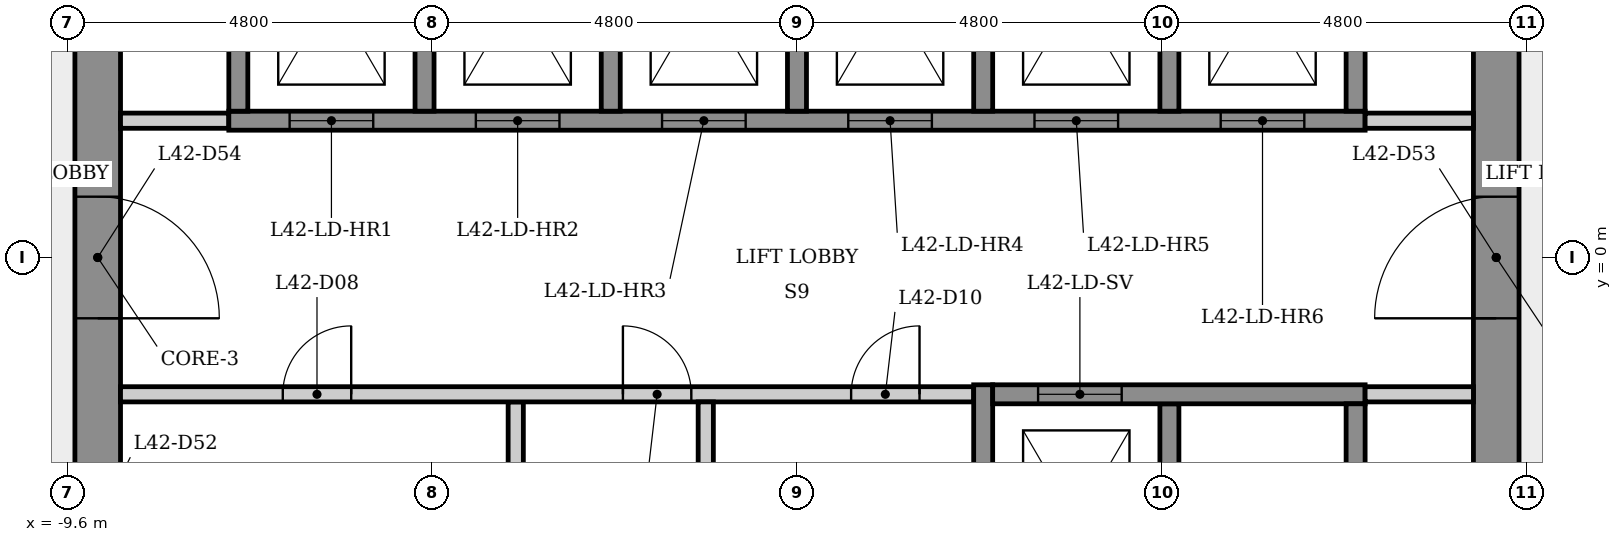
"""IFC4 building model, lengths in metres.
Left out: names, types, materials, properties, quantities, classifications, styles, units other than length and angle.
Written with IfcOpenShell. Run it as: python <this file> out.ifc"""

import sys

from ifc_helpers import new_model, si_unit, direction, frame, frame_2d, origin, place, context, subcontext, project, spatial, rectangle, extrude, element, fill, save


model = new_model("IFC4")
c1 = context("Model", 3, precision=1e-05, world=origin(), true_north=direction((0.0, 1.0)))
c2 = subcontext(c1, "Body", "Model", "MODEL_VIEW")
j1 = project(units=[si_unit("LENGTHUNIT", "METRE"), si_unit("PLANEANGLEUNIT", "RADIAN")], contexts=[c1])
p1 = place(None, origin())
s1 = spatial("IfcSite", under=j1, at=p1, CompositionType="ELEMENT")
p2 = place(p1, origin())
s2 = spatial("IfcBuilding", under=s1, at=p2, CompositionType="ELEMENT")
p3 = place(p2, frame((0.0, 0.0, 159.5)))
s3 = spatial("IfcBuildingStorey", under=s2, at=p3, CompositionType="ELEMENT", Elevation=159.5)
p4 = place(p3, frame((9.2, -5.485, 0.0), z_axis=(0.0, 0.0, 1.0), x_axis=(0.0, 1.0, 0.0)))
e1 = element("IfcWall", 1, at=p4, inside=s3, PredefinedType="SHEAR", context=c2, shape_type="SweptSolid", body=[
    extrude(rectangle(XDim=10.97, YDim=0.6, at=frame_2d((5.485, 0.0))), origin(), (0.0, 0.0, 1.0), 3.4),
])
p5 = place(p4, frame((4.685, 0.0, 0.0)))
e2 = element("IfcOpeningElement", 2, at=p5, cuts=e1, PredefinedType="OPENING", context=c2, shape_type="SweptSolid", body=[
    extrude(rectangle(XDim=1.6, YDim=2.1, at=frame_2d((0.8, 1.05))), frame((0.0, 0.31, 0.0), z_axis=(0.0, -1.0, 0.0), x_axis=(1.0, 0.0, 0.0)), (0.0, 0.0, 1.0), 0.62),
])
p6 = place(p3, frame((-9.2, 5.485, 0.0), z_axis=(0.0, 0.0, 1.0), x_axis=(0.0, -1.0, 0.0)))
e3 = element("IfcWall", 3, at=p6, inside=s3, PredefinedType="SHEAR", context=c2, shape_type="SweptSolid", body=[
    extrude(rectangle(XDim=10.97, YDim=0.6, at=frame_2d((5.485, 0.0))), origin(), (0.0, 0.0, 1.0), 3.4),
])
p7 = place(p6, frame((8.516, 0.0, 0.0)))
e4 = element("IfcOpeningElement", 4, at=p7, cuts=e3, PredefinedType="OPENING", context=c2, shape_type="SweptSolid", body=[
    extrude(rectangle(XDim=0.9, YDim=2.1, at=frame_2d((0.45, 1.05))), frame((0.0, 0.31, 0.0), z_axis=(0.0, -1.0, 0.0), x_axis=(1.0, 0.0, 0.0)), (0.0, 0.0, 1.0), 0.62),
])
p8 = place(p6, frame((4.685, 0.0, 0.0)))
e5 = element("IfcOpeningElement", 5, at=p8, cuts=e3, PredefinedType="OPENING", context=c2, shape_type="SweptSolid", body=[
    extrude(rectangle(XDim=1.6, YDim=2.1, at=frame_2d((0.8, 1.05))), frame((0.0, 0.31, 0.0), z_axis=(0.0, -1.0, 0.0), x_axis=(1.0, 0.0, 0.0)), (0.0, 0.0, 1.0), 0.62),
])
p9 = place(p3, frame((-8.9, 1.8, 0.0), z_axis=(0.0, 0.0, 1.0), x_axis=(1.0, 0.0, 0.0)))
e6 = element("IfcWall", 6, at=p9, inside=s3, PredefinedType="PARTITIONING", context=c2, shape_type="SweptSolid", body=[
    extrude(rectangle(XDim=1.425, YDim=0.2, at=frame_2d((0.712, 0.0))), origin(), (0.0, 0.0, 1.0), 3.05),
])
p10 = place(p3, frame((-7.475, 1.8, 0.0), z_axis=(0.0, 0.0, 1.0), x_axis=(1.0, 0.0, 0.0)))
e7 = element("IfcWall", 7, at=p10, inside=s3, PredefinedType="SHEAR", context=c2, shape_type="SweptSolid", body=[
    extrude(rectangle(XDim=14.95, YDim=0.25, at=frame_2d((7.475, 0.0))), origin(), (0.0, 0.0, 1.0), 3.05),
])
p11 = place(p10, frame((0.8, 0.0, 0.0)))
e8 = element("IfcOpeningElement", 8, at=p11, cuts=e7, PredefinedType="OPENING", context=c2, shape_type="SweptSolid", body=[
    extrude(rectangle(XDim=1.1, YDim=2.1, at=frame_2d((0.55, 1.05))), frame((0.0, 0.135, 0.0), z_axis=(0.0, -1.0, 0.0), x_axis=(1.0, 0.0, 0.0)), (0.0, 0.0, 1.0), 0.27),
])
p12 = place(p10, frame((3.25, 0.0, 0.0)))
e9 = element("IfcOpeningElement", 9, at=p12, cuts=e7, PredefinedType="OPENING", context=c2, shape_type="SweptSolid", body=[
    extrude(rectangle(XDim=1.1, YDim=2.1, at=frame_2d((0.55, 1.05))), frame((0.0, 0.135, 0.0), z_axis=(0.0, -1.0, 0.0), x_axis=(1.0, 0.0, 0.0)), (0.0, 0.0, 1.0), 0.27),
])
p13 = place(p10, frame((5.7, 0.0, 0.0)))
e10 = element("IfcOpeningElement", 10, at=p13, cuts=e7, PredefinedType="OPENING", context=c2, shape_type="SweptSolid", body=[
    extrude(rectangle(XDim=1.1, YDim=2.1, at=frame_2d((0.55, 1.05))), frame((0.0, 0.135, 0.0), z_axis=(0.0, -1.0, 0.0), x_axis=(1.0, 0.0, 0.0)), (0.0, 0.0, 1.0), 0.27),
])
p14 = place(p10, frame((8.15, 0.0, 0.0)))
e11 = element("IfcOpeningElement", 11, at=p14, cuts=e7, PredefinedType="OPENING", context=c2, shape_type="SweptSolid", body=[
    extrude(rectangle(XDim=1.1, YDim=2.1, at=frame_2d((0.55, 1.05))), frame((0.0, 0.135, 0.0), z_axis=(0.0, -1.0, 0.0), x_axis=(1.0, 0.0, 0.0)), (0.0, 0.0, 1.0), 0.27),
])
p15 = place(p10, frame((10.6, 0.0, 0.0)))
e12 = element("IfcOpeningElement", 12, at=p15, cuts=e7, PredefinedType="OPENING", context=c2, shape_type="SweptSolid", body=[
    extrude(rectangle(XDim=1.1, YDim=2.1, at=frame_2d((0.55, 1.05))), frame((0.0, 0.135, 0.0), z_axis=(0.0, -1.0, 0.0), x_axis=(1.0, 0.0, 0.0)), (0.0, 0.0, 1.0), 0.27),
])
p16 = place(p10, frame((13.05, 0.0, 0.0)))
e13 = element("IfcOpeningElement", 13, at=p16, cuts=e7, PredefinedType="OPENING", context=c2, shape_type="SweptSolid", body=[
    extrude(rectangle(XDim=1.1, YDim=2.1, at=frame_2d((0.55, 1.05))), frame((0.0, 0.135, 0.0), z_axis=(0.0, -1.0, 0.0), x_axis=(1.0, 0.0, 0.0)), (0.0, 0.0, 1.0), 0.27),
])
p17 = place(p3, frame((-7.35, 1.925, 0.0), z_axis=(0.0, 0.0, 1.0), x_axis=(0.0, 1.0, 0.0)))
e14 = element("IfcWall", 14, at=p17, inside=s3, PredefinedType="SHEAR", context=c2, shape_type="SweptSolid", body=[
    extrude(rectangle(XDim=4.036, YDim=0.25, at=frame_2d((2.018, 0.0))), origin(), (0.0, 0.0, 1.0), 3.05),
])
p18 = place(p3, frame((-4.9, 5.025, 0.0), z_axis=(0.0, 0.0, 1.0), x_axis=(0.0, -1.0, 0.0)))
e15 = element("IfcWall", 15, at=p18, inside=s3, PredefinedType="SHEAR", context=c2, shape_type="SweptSolid", body=[
    extrude(rectangle(XDim=3.1, YDim=0.25, at=frame_2d((1.55, 0.0))), origin(), (0.0, 0.0, 1.0), 3.4),
])
p19 = place(p3, frame((-3.7, -1.9, 0.0), z_axis=(0.0, 0.0, 1.0), x_axis=(0.0, -1.0, 0.0)))
e16 = element("IfcWall", 16, at=p19, inside=s3, PredefinedType="PARTITIONING", context=c2, shape_type="SweptSolid", body=[
    extrude(rectangle(XDim=3.15, YDim=0.2, at=frame_2d((1.575, 0.0))), origin(), (0.0, 0.0, 1.0), 3.05),
])
p20 = place(p3, frame((-8.9, -1.8, 0.0), z_axis=(0.0, 0.0, 1.0), x_axis=(1.0, 0.0, 0.0)))
e17 = element("IfcWall", 17, at=p20, inside=s3, PredefinedType="PARTITIONING", context=c2, shape_type="SweptSolid", body=[
    extrude(rectangle(XDim=11.225, YDim=0.2, at=frame_2d((5.613, 0.0))), origin(), (0.0, 0.0, 1.0), 3.05),
])
p21 = place(p20, frame((2.135, 0.0, 0.0)))
e18 = element("IfcOpeningElement", 18, at=p21, cuts=e17, PredefinedType="OPENING", context=c2, shape_type="SweptSolid", body=[
    extrude(rectangle(XDim=0.9, YDim=2.1, at=frame_2d((0.45, 1.05))), frame((0.0, 0.11, 0.0), z_axis=(0.0, -1.0, 0.0), x_axis=(1.0, 0.0, 0.0)), (0.0, 0.0, 1.0), 0.22),
])
p22 = place(p20, frame((6.61, 0.0, 0.0)))
e19 = element("IfcOpeningElement", 19, at=p22, cuts=e17, PredefinedType="OPENING", context=c2, shape_type="SweptSolid", body=[
    extrude(rectangle(XDim=0.9, YDim=2.1, at=frame_2d((0.45, 1.05))), frame((0.0, 0.11, 0.0), z_axis=(0.0, -1.0, 0.0), x_axis=(1.0, 0.0, 0.0)), (0.0, 0.0, 1.0), 0.22),
])
p23 = place(p20, frame((9.613, 0.0, 0.0)))
e20 = element("IfcOpeningElement", 20, at=p23, cuts=e17, PredefinedType="OPENING", context=c2, shape_type="SweptSolid", body=[
    extrude(rectangle(XDim=0.9, YDim=2.1, at=frame_2d((0.45, 1.05))), frame((0.0, 0.11, 0.0), z_axis=(0.0, -1.0, 0.0), x_axis=(1.0, 0.0, 0.0)), (0.0, 0.0, 1.0), 0.22),
])
p24 = place(p3, frame((-2.45, 5.025, 0.0), z_axis=(0.0, 0.0, 1.0), x_axis=(0.0, -1.0, 0.0)))
e21 = element("IfcWall", 21, at=p24, inside=s3, PredefinedType="SHEAR", context=c2, shape_type="SweptSolid", body=[
    extrude(rectangle(XDim=3.1, YDim=0.25, at=frame_2d((1.55, 0.0))), origin(), (0.0, 0.0, 1.0), 3.4),
])
p25 = place(p3, frame((-1.2, -1.9, 0.0), z_axis=(0.0, 0.0, 1.0), x_axis=(0.0, -1.0, 0.0)))
e22 = element("IfcWall", 22, at=p25, inside=s3, PredefinedType="PARTITIONING", context=c2, shape_type="SweptSolid", body=[
    extrude(rectangle(XDim=3.15, YDim=0.2, at=frame_2d((1.575, 0.0))), origin(), (0.0, 0.0, 1.0), 3.05),
])
p26 = place(p3, frame((0.0, 5.025, 0.0), z_axis=(0.0, 0.0, 1.0), x_axis=(0.0, -1.0, 0.0)))
e23 = element("IfcWall", 23, at=p26, inside=s3, PredefinedType="SHEAR", context=c2, shape_type="SweptSolid", body=[
    extrude(rectangle(XDim=3.1, YDim=0.25, at=frame_2d((1.55, 0.0))), origin(), (0.0, 0.0, 1.0), 3.4),
])
p27 = place(p3, frame((2.45, -5.275, 0.0), z_axis=(0.0, 0.0, 1.0), x_axis=(0.0, 1.0, 0.0)))
e24 = element("IfcWall", 24, at=p27, inside=s3, PredefinedType="SHEAR", context=c2, shape_type="SweptSolid", body=[
    extrude(rectangle(XDim=3.6, YDim=0.25, at=frame_2d((1.8, 0.0))), origin(), (0.0, 0.0, 1.0), 3.05),
])
for number, where, z_axis, x_axis in (
    (25, (2.45, 5.025, 0.0), (0.0, 0.0, 1.0), (0.0, -1.0, 0.0)),
    (26, (4.9, -1.925, 0.0), (0.0, 0.0, 1.0), (0.0, -1.0, 0.0)),
    (27, (4.9, 5.025, 0.0), (0.0, 0.0, 1.0), (0.0, -1.0, 0.0)),
):
    element("IfcWall", number, at=place(p3, frame(where, z_axis=z_axis, x_axis=x_axis)), inside=s3, PredefinedType="SHEAR", context=c2, shape_type="SweptSolid", body=[
        extrude(rectangle(XDim=3.1, YDim=0.25, at=frame_2d((1.55, 0.0))), origin(), (0.0, 0.0, 1.0), 3.4),
    ])
p28 = place(p3, frame((2.575, -1.8, 0.0), z_axis=(0.0, 0.0, 1.0), x_axis=(1.0, 0.0, 0.0)))
e28 = element("IfcWall", 28, at=p28, inside=s3, PredefinedType="SHEAR", context=c2, shape_type="SweptSolid", body=[
    extrude(rectangle(XDim=4.9, YDim=0.25, at=frame_2d((2.45, 0.0))), origin(), (0.0, 0.0, 1.0), 3.05),
])
p29 = place(p28, frame((0.597, 0.0, 0.0)))
e29 = element("IfcOpeningElement", 29, at=p29, cuts=e28, PredefinedType="OPENING", context=c2, shape_type="SweptSolid", body=[
    extrude(rectangle(XDim=1.1, YDim=2.1, at=frame_2d((0.55, 1.05))), frame((0.0, 0.135, 0.0), z_axis=(0.0, -1.0, 0.0), x_axis=(1.0, 0.0, 0.0)), (0.0, 0.0, 1.0), 0.27),
])
p30 = place(p3, frame((7.475, 1.8, 0.0), z_axis=(0.0, 0.0, 1.0), x_axis=(1.0, 0.0, 0.0)))
e30 = element("IfcWall", 30, at=p30, inside=s3, PredefinedType="PARTITIONING", context=c2, shape_type="SweptSolid", body=[
    extrude(rectangle(XDim=1.425, YDim=0.2, at=frame_2d((0.712, 0.0))), origin(), (0.0, 0.0, 1.0), 3.05),
])
for number, where, z_axis, x_axis in (
    (31, (7.35, -1.925, 0.0), (0.0, 0.0, 1.0), (0.0, -1.0, 0.0)),
    (32, (7.35, 5.025, 0.0), (0.0, 0.0, 1.0), (0.0, -1.0, 0.0)),
):
    element("IfcWall", number, at=place(p3, frame(where, z_axis=z_axis, x_axis=x_axis)), inside=s3, PredefinedType="SHEAR", context=c2, shape_type="SweptSolid", body=[
        extrude(rectangle(XDim=3.1, YDim=0.25, at=frame_2d((1.55, 0.0))), origin(), (0.0, 0.0, 1.0), 3.4),
    ])
p31 = place(p3, frame((8.9, -1.8, 0.0), z_axis=(0.0, 0.0, 1.0), x_axis=(-1.0, 0.0, 0.0)))
e33 = element("IfcWall", 33, at=p31, inside=s3, PredefinedType="PARTITIONING", context=c2, shape_type="SweptSolid", body=[
    extrude(rectangle(XDim=1.425, YDim=0.2, at=frame_2d((0.712, 0.0))), origin(), (0.0, 0.0, 1.0), 3.05),
])
p32 = place(p11, origin())
e34 = element("IfcDoor", 34, at=p32, inside=s3, OperationType="SLIDING_TO_LEFT", PredefinedType="DOOR", context=c2, shape_type="SweptSolid", body=[
    extrude(rectangle(XDim=1.1, YDim=2.1, at=frame_2d((0.55, 1.05))), frame((0.0, 0.025, 0.0), z_axis=(0.0, -1.0, 0.0), x_axis=(1.0, 0.0, 0.0)), (0.0, 0.0, 1.0), 0.05),
])
fill(e8, e34)
p33 = place(p12, origin())
e35 = element("IfcDoor", 35, at=p33, inside=s3, OperationType="SLIDING_TO_LEFT", PredefinedType="DOOR", context=c2, shape_type="SweptSolid", body=[
    extrude(rectangle(XDim=1.1, YDim=2.1, at=frame_2d((0.55, 1.05))), frame((0.0, 0.025, 0.0), z_axis=(0.0, -1.0, 0.0), x_axis=(1.0, 0.0, 0.0)), (0.0, 0.0, 1.0), 0.05),
])
fill(e9, e35)
p34 = place(p13, origin())
e36 = element("IfcDoor", 36, at=p34, inside=s3, OperationType="SLIDING_TO_LEFT", PredefinedType="DOOR", context=c2, shape_type="SweptSolid", body=[
    extrude(rectangle(XDim=1.1, YDim=2.1, at=frame_2d((0.55, 1.05))), frame((0.0, 0.025, 0.0), z_axis=(0.0, -1.0, 0.0), x_axis=(1.0, 0.0, 0.0)), (0.0, 0.0, 1.0), 0.05),
])
fill(e10, e36)
p35 = place(p14, origin())
e37 = element("IfcDoor", 37, at=p35, inside=s3, OperationType="SLIDING_TO_LEFT", PredefinedType="DOOR", context=c2, shape_type="SweptSolid", body=[
    extrude(rectangle(XDim=1.1, YDim=2.1, at=frame_2d((0.55, 1.05))), frame((0.0, 0.025, 0.0), z_axis=(0.0, -1.0, 0.0), x_axis=(1.0, 0.0, 0.0)), (0.0, 0.0, 1.0), 0.05),
])
fill(e11, e37)
p36 = place(p15, origin())
e38 = element("IfcDoor", 38, at=p36, inside=s3, OperationType="SLIDING_TO_LEFT", PredefinedType="DOOR", context=c2, shape_type="SweptSolid", body=[
    extrude(rectangle(XDim=1.1, YDim=2.1, at=frame_2d((0.55, 1.05))), frame((0.0, 0.025, 0.0), z_axis=(0.0, -1.0, 0.0), x_axis=(1.0, 0.0, 0.0)), (0.0, 0.0, 1.0), 0.05),
])
fill(e12, e38)
p37 = place(p16, origin())
e39 = element("IfcDoor", 39, at=p37, inside=s3, OperationType="SLIDING_TO_LEFT", PredefinedType="DOOR", context=c2, shape_type="SweptSolid", body=[
    extrude(rectangle(XDim=1.1, YDim=2.1, at=frame_2d((0.55, 1.05))), frame((0.0, 0.025, 0.0), z_axis=(0.0, -1.0, 0.0), x_axis=(1.0, 0.0, 0.0)), (0.0, 0.0, 1.0), 0.05),
])
fill(e13, e39)
p38 = place(p29, origin())
e40 = element("IfcDoor", 40, at=p38, inside=s3, OperationType="SLIDING_TO_LEFT", PredefinedType="DOOR", context=c2, shape_type="SweptSolid", body=[
    extrude(rectangle(XDim=1.1, YDim=2.1, at=frame_2d((0.55, 1.05))), frame((0.0, 0.025, 0.0), z_axis=(0.0, -1.0, 0.0), x_axis=(1.0, 0.0, 0.0)), (0.0, 0.0, 1.0), 0.05),
])
fill(e29, e40)
p39 = place(p21, origin())
e41 = element("IfcDoor", 41, at=p39, inside=s3, OperationType="SINGLE_SWING_RIGHT", PredefinedType="DOOR", context=c2, shape_type="SweptSolid", body=[
    extrude(rectangle(XDim=0.9, YDim=2.1, at=frame_2d((0.45, 1.05))), frame((0.0, 0.025, 0.0), z_axis=(0.0, -1.0, 0.0), x_axis=(1.0, 0.0, 0.0)), (0.0, 0.0, 1.0), 0.05),
])
fill(e18, e41)
p40 = place(p22, origin())
e42 = element("IfcDoor", 42, at=p40, inside=s3, OperationType="SINGLE_SWING_LEFT", PredefinedType="DOOR", context=c2, shape_type="SweptSolid", body=[
    extrude(rectangle(XDim=0.9, YDim=2.1, at=frame_2d((0.45, 1.05))), frame((0.0, 0.025, 0.0), z_axis=(0.0, -1.0, 0.0), x_axis=(1.0, 0.0, 0.0)), (0.0, 0.0, 1.0), 0.05),
])
fill(e19, e42)
p41 = place(p23, origin())
e43 = element("IfcDoor", 43, at=p41, inside=s3, OperationType="SINGLE_SWING_RIGHT", PredefinedType="DOOR", context=c2, shape_type="SweptSolid", body=[
    extrude(rectangle(XDim=0.9, YDim=2.1, at=frame_2d((0.45, 1.05))), frame((0.0, 0.025, 0.0), z_axis=(0.0, -1.0, 0.0), x_axis=(1.0, 0.0, 0.0)), (0.0, 0.0, 1.0), 0.05),
])
fill(e20, e43)
p42 = place(p5, origin())
e44 = element("IfcDoor", 44, at=p42, inside=s3, OperationType="SINGLE_SWING_LEFT", PredefinedType="DOOR", context=c2, shape_type="SweptSolid", body=[
    extrude(rectangle(XDim=1.6, YDim=2.1, at=frame_2d((0.8, 1.05))), frame((0.0, 0.025, 0.0), z_axis=(0.0, -1.0, 0.0), x_axis=(1.0, 0.0, 0.0)), (0.0, 0.0, 1.0), 0.05),
])
fill(e2, e44)
p43 = place(p8, origin())
e45 = element("IfcDoor", 45, at=p43, inside=s3, OperationType="SINGLE_SWING_RIGHT", PredefinedType="DOOR", context=c2, shape_type="SweptSolid", body=[
    extrude(rectangle(XDim=1.6, YDim=2.1, at=frame_2d((0.8, 1.05))), frame((0.0, 0.025, 0.0), z_axis=(0.0, -1.0, 0.0), x_axis=(1.0, 0.0, 0.0)), (0.0, 0.0, 1.0), 0.05),
])
fill(e5, e45)
save(model, sys.argv[1])
